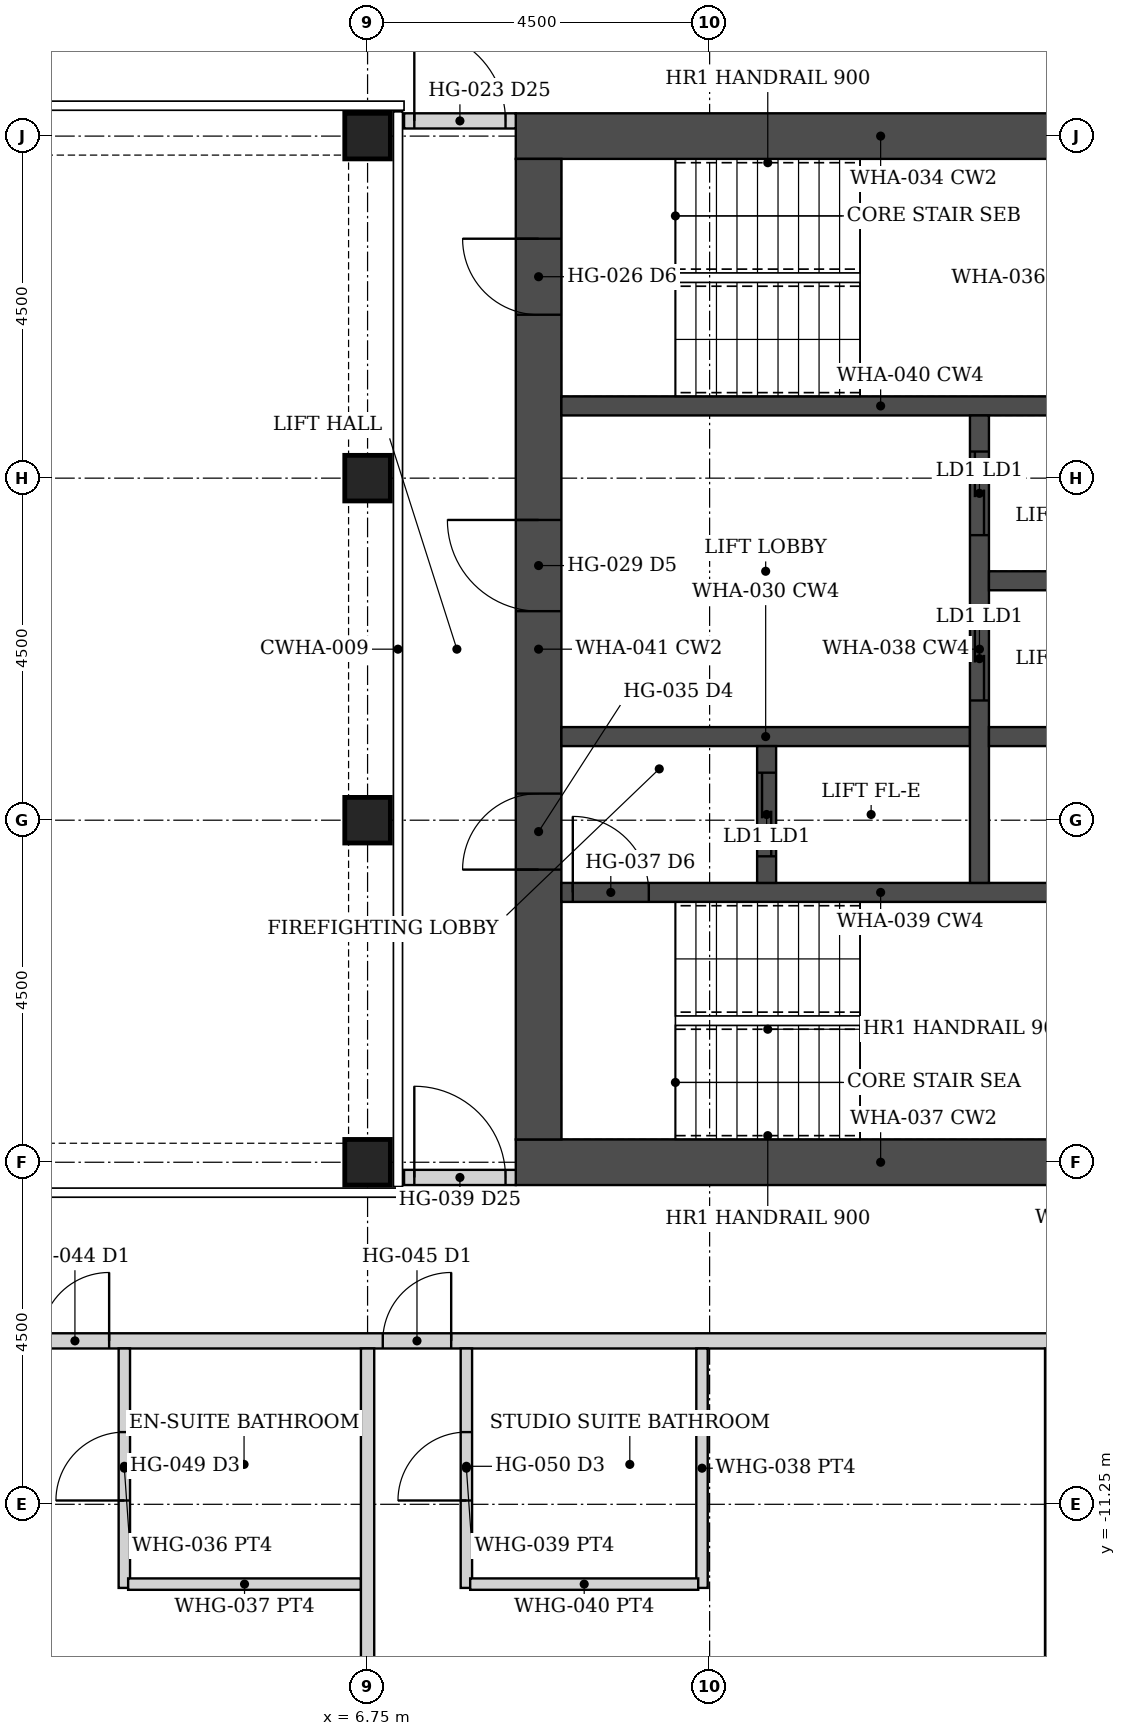
"""IFC4 building model, lengths in metres.
Left out: names, types, materials, properties, quantities, classifications, styles, units other than length and angle.
Written with IfcOpenShell. Run it as: python <this file> out.ifc"""

import sys

from ifc_helpers import new_model, si_unit, direction, frame, frame_2d, origin, origin_2d, place, context, subcontext, project, spatial, rectangle, hollow_rectangle, extrude, element, fill, save


model = new_model("IFC4")
c1 = context("Model", 3, precision=1e-05, world=origin(), true_north=direction((0.0, 1.0)))
c2 = subcontext(c1, "Body", "Model", "MODEL_VIEW")
j1 = project(units=[si_unit("LENGTHUNIT", "METRE"), si_unit("PLANEANGLEUNIT", "RADIAN")], contexts=[c1])
p1 = place(None, origin())
s1 = spatial("IfcSite", under=j1, at=p1, CompositionType="ELEMENT")
p2 = place(p1, origin())
s2 = spatial("IfcBuilding", under=s1, at=p2, CompositionType="ELEMENT")
p3 = place(p2, frame((0.0, 0.0, 183.2)))
s3 = spatial("IfcBuildingStorey", under=s2, at=p3, CompositionType="ELEMENT", Elevation=183.2)
for number, where, z_axis, x_axis in (
    (1, (6.75, -6.75, 0.0), (0.0, 0.0, 1.0), (1.0, 0.0, 0.0)),
    (2, (6.75, -2.25, 0.0), (0.0, 0.0, 1.0), (1.0, 0.0, 0.0)),
    (3, (6.75, 2.25, 0.0), (0.0, 0.0, 1.0), (1.0, 0.0, 0.0)),
    (4, (6.75, 6.75, 0.0), (0.0, 0.0, 1.0), (1.0, 0.0, 0.0)),
):
    element("IfcColumn", number, at=place(p3, frame(where, z_axis=z_axis, x_axis=x_axis)), inside=s3, PredefinedType="COLUMN", context=c2, shape_type="SweptSolid", body=[
        extrude(hollow_rectangle(XDim=0.6, YDim=0.6, WallThickness=0.03, at=origin_2d()), origin(), (0.0, 0.0, 1.0), 3.6),
    ])
for number, where, z_axis, x_axis in (
    (5, (8.7, -6.75, 0.0), (0.0, 0.0, 1.0), (1.0, 0.0, 0.0)),
    (6, (8.7, 6.75, 0.0), (0.0, 0.0, 1.0), (1.0, 0.0, 0.0)),
):
    element("IfcWall", number, at=place(p3, frame(where, z_axis=z_axis, x_axis=x_axis)), inside=s3, PredefinedType="SHEAR", context=c2, shape_type="SweptSolid", body=[
        extrude(rectangle(XDim=9.6, YDim=0.6, at=frame_2d((4.8, 0.0))), origin(), (0.0, 0.0, 1.0), 3.6),
    ])
p4 = place(p3, frame((9.0, -6.45, 0.0), z_axis=(0.0, 0.0, 1.0), x_axis=(0.0, 1.0, 0.0)))
e7 = element("IfcWall", 7, at=p4, inside=s3, PredefinedType="SHEAR", context=c2, shape_type="SweptSolid", body=[
    extrude(rectangle(XDim=12.9, YDim=0.6, at=frame_2d((6.45, 0.0))), origin(), (0.0, 0.0, 1.0), 3.6),
])
p5 = place(p4, frame((3.55, 0.0, 0.0)))
e8 = element("IfcOpeningElement", 8, at=p5, cuts=e7, PredefinedType="OPENING", context=c2, shape_type="SweptSolid", body=[
    extrude(rectangle(XDim=1.0, YDim=2.1, at=frame_2d((0.5, 1.05))), frame((0.0, 0.31, 0.0), z_axis=(0.0, -1.0, 0.0), x_axis=(1.0, 0.0, 0.0)), (0.0, 0.0, 1.0), 0.62),
])
p6 = place(p4, frame((6.95, 0.0, 0.0)))
e9 = element("IfcOpeningElement", 9, at=p6, cuts=e7, PredefinedType="OPENING", context=c2, shape_type="SweptSolid", body=[
    extrude(rectangle(XDim=1.2, YDim=2.1, at=frame_2d((0.6, 1.05))), frame((0.0, 0.31, 0.0), z_axis=(0.0, -1.0, 0.0), x_axis=(1.0, 0.0, 0.0)), (0.0, 0.0, 1.0), 0.62),
])
p7 = place(p4, frame((10.85, 0.0, 0.0)))
e10 = element("IfcOpeningElement", 10, at=p7, cuts=e7, PredefinedType="OPENING", context=c2, shape_type="SweptSolid", body=[
    extrude(rectangle(XDim=1.0, YDim=2.1, at=frame_2d((0.5, 1.05))), frame((0.0, 0.31, 0.0), z_axis=(0.0, -1.0, 0.0), x_axis=(1.0, 0.0, 0.0)), (0.0, 0.0, 1.0), 0.62),
])
p8 = place(p3, frame((9.3, -3.2, 0.0), z_axis=(0.0, 0.0, 1.0), x_axis=(1.0, 0.0, 0.0)))
e11 = element("IfcWall", 11, at=p8, inside=s3, PredefinedType="SHEAR", context=c2, shape_type="SweptSolid", body=[
    extrude(rectangle(XDim=8.4, YDim=0.25, at=frame_2d((4.2, 0.0))), origin(), (0.0, 0.0, 1.0), 3.6),
])
p9 = place(p8, frame((0.15, 0.0, 0.0)))
e12 = element("IfcOpeningElement", 12, at=p9, cuts=e11, PredefinedType="OPENING", context=c2, shape_type="SweptSolid", body=[
    extrude(rectangle(XDim=1.0, YDim=2.1, at=frame_2d((0.5, 1.05))), frame((0.0, 0.135, 0.0), z_axis=(0.0, -1.0, 0.0), x_axis=(1.0, 0.0, 0.0)), (0.0, 0.0, 1.0), 0.27),
])
p10 = place(p3, frame((9.3, 3.2, 0.0), z_axis=(0.0, 0.0, 1.0), x_axis=(1.0, 0.0, 0.0)))
e13 = element("IfcWall", 13, at=p10, inside=s3, PredefinedType="SHEAR", context=c2, shape_type="SweptSolid", body=[
    extrude(rectangle(XDim=8.4, YDim=0.25, at=frame_2d((4.2, 0.0))), origin(), (0.0, 0.0, 1.0), 3.6),
])
p11 = place(p3, frame((9.3, -1.15, 0.0), z_axis=(0.0, 0.0, 1.0), x_axis=(1.0, 0.0, 0.0)))
e14 = element("IfcWall", 14, at=p11, inside=s3, PredefinedType="SHEAR", context=c2, shape_type="SweptSolid", body=[
    extrude(rectangle(XDim=5.375, YDim=0.25, at=frame_2d((2.688, 0.0))), origin(), (0.0, 0.0, 1.0), 3.6),
])
p12 = place(p3, frame((12.0, -3.075, 0.0), z_axis=(0.0, 0.0, 1.0), x_axis=(0.0, 1.0, 0.0)))
e15 = element("IfcWall", 15, at=p12, inside=s3, PredefinedType="SHEAR", context=c2, shape_type="SweptSolid", body=[
    extrude(rectangle(XDim=1.8, YDim=0.25, at=frame_2d((0.9, 0.0))), origin(), (0.0, 0.0, 1.0), 3.6),
])
p13 = place(p12, frame((0.35, 0.0, 0.0)))
e16 = element("IfcOpeningElement", 16, at=p13, cuts=e15, PredefinedType="OPENING", context=c2, shape_type="SweptSolid", body=[
    extrude(rectangle(XDim=1.1, YDim=2.1, at=frame_2d((0.55, 1.05))), frame((0.0, 0.135, 0.0), z_axis=(0.0, -1.0, 0.0), x_axis=(1.0, 0.0, 0.0)), (0.0, 0.0, 1.0), 0.27),
])
p14 = place(p3, frame((14.8, -3.075, 0.0), z_axis=(0.0, 0.0, 1.0), x_axis=(0.0, 1.0, 0.0)))
e17 = element("IfcWall", 17, at=p14, inside=s3, PredefinedType="SHEAR", context=c2, shape_type="SweptSolid", body=[
    extrude(rectangle(XDim=6.15, YDim=0.25, at=frame_2d((3.075, 0.0))), origin(), (0.0, 0.0, 1.0), 3.6),
])
p15 = place(p14, frame((2.4, 0.0, 0.0)))
e18 = element("IfcOpeningElement", 18, at=p15, cuts=e17, PredefinedType="OPENING", context=c2, shape_type="SweptSolid", body=[
    extrude(rectangle(XDim=1.1, YDim=2.1, at=frame_2d((0.55, 1.05))), frame((0.0, 0.135, 0.0), z_axis=(0.0, -1.0, 0.0), x_axis=(1.0, 0.0, 0.0)), (0.0, 0.0, 1.0), 0.27),
])
p16 = place(p14, frame((4.575, 0.0, 0.0)))
e19 = element("IfcOpeningElement", 19, at=p16, cuts=e17, PredefinedType="OPENING", context=c2, shape_type="SweptSolid", body=[
    extrude(rectangle(XDim=1.1, YDim=2.1, at=frame_2d((0.55, 1.05))), frame((0.0, 0.135, 0.0), z_axis=(0.0, -1.0, 0.0), x_axis=(1.0, 0.0, 0.0)), (0.0, 0.0, 1.0), 0.27),
])
for number, where, z_axis, x_axis in (
    (20, (14.925, -1.15, 0.0), (0.0, 0.0, 1.0), (1.0, 0.0, 0.0)),
    (21, (14.925, 0.9, 0.0), (0.0, 0.0, 1.0), (1.0, 0.0, 0.0)),
):
    element("IfcWall", number, at=place(p3, frame(where, z_axis=z_axis, x_axis=x_axis)), inside=s3, PredefinedType="SHEAR", context=c2, shape_type="SweptSolid", body=[
        extrude(rectangle(XDim=2.775, YDim=0.25, at=frame_2d((1.387, 0.0))), origin(), (0.0, 0.0, 1.0), 3.6),
    ])
p17 = place(p3, frame((7.23, 6.95, 0.0), z_axis=(0.0, 0.0, 1.0), x_axis=(1.0, 0.0, 0.0)))
e22 = element("IfcWall", 22, at=p17, inside=s3, PredefinedType="PARTITIONING", context=c2, shape_type="SweptSolid", body=[
    extrude(rectangle(XDim=1.47, YDim=0.2, at=frame_2d((0.735, 0.0))), origin(), (0.0, 0.0, 1.0), 2.473),
])
p18 = place(p17, frame((0.135, 0.0, 0.0)))
e23 = element("IfcOpeningElement", 23, at=p18, cuts=e22, PredefinedType="OPENING", context=c2, shape_type="SweptSolid", body=[
    extrude(rectangle(XDim=1.2, YDim=2.1, at=frame_2d((0.6, 1.05))), frame((0.0, 0.11, 0.0), z_axis=(0.0, -1.0, 0.0), x_axis=(1.0, 0.0, 0.0)), (0.0, 0.0, 1.0), 0.22),
])
p19 = place(p3, frame((7.23, -6.95, 0.0), z_axis=(0.0, 0.0, 1.0), x_axis=(1.0, 0.0, 0.0)))
e24 = element("IfcWall", 24, at=p19, inside=s3, PredefinedType="PARTITIONING", context=c2, shape_type="SweptSolid", body=[
    extrude(rectangle(XDim=1.47, YDim=0.2, at=frame_2d((0.735, 0.0))), origin(), (0.0, 0.0, 1.0), 2.473),
])
p20 = place(p19, frame((0.135, 0.0, 0.0)))
e25 = element("IfcOpeningElement", 25, at=p20, cuts=e24, PredefinedType="OPENING", context=c2, shape_type="SweptSolid", body=[
    extrude(rectangle(XDim=1.2, YDim=2.1, at=frame_2d((0.6, 1.05))), frame((0.0, 0.11, 0.0), z_axis=(0.0, -1.0, 0.0), x_axis=(1.0, 0.0, 0.0)), (0.0, 0.0, 1.0), 0.22),
])
p21 = place(p3, frame((-22.3, -9.1, 0.0), z_axis=(0.0, 0.0, 1.0), x_axis=(1.0, 0.0, 0.0)))
e26 = element("IfcWall", 26, at=p21, inside=s3, PredefinedType="PARTITIONING", context=c2, shape_type="SweptSolid", body=[
    extrude(rectangle(XDim=44.6, YDim=0.2, at=frame_2d((22.3, 0.0))), origin(), (0.0, 0.0, 1.0), 2.473),
])
p22 = place(p21, frame((11.35, 0.0, 0.0)))
e27 = element("IfcOpeningElement", 27, at=p22, cuts=e26, PredefinedType="OPENING", context=c2, shape_type="SweptSolid", body=[
    extrude(rectangle(XDim=0.9, YDim=2.1, at=frame_2d((0.45, 1.05))), frame((0.0, 0.11, 0.0), z_axis=(0.0, -1.0, 0.0), x_axis=(1.0, 0.0, 0.0)), (0.0, 0.0, 1.0), 0.22),
])
p23 = place(p21, frame((15.75, 0.0, 0.0)))
e28 = element("IfcOpeningElement", 28, at=p23, cuts=e26, PredefinedType="OPENING", context=c2, shape_type="SweptSolid", body=[
    extrude(rectangle(XDim=0.9, YDim=2.1, at=frame_2d((0.45, 1.05))), frame((0.0, 0.11, 0.0), z_axis=(0.0, -1.0, 0.0), x_axis=(1.0, 0.0, 0.0)), (0.0, 0.0, 1.0), 0.22),
])
p24 = place(p21, frame((23.45, 0.0, 0.0)))
e29 = element("IfcOpeningElement", 29, at=p24, cuts=e26, PredefinedType="OPENING", context=c2, shape_type="SweptSolid", body=[
    extrude(rectangle(XDim=0.9, YDim=2.1, at=frame_2d((0.45, 1.05))), frame((0.0, 0.11, 0.0), z_axis=(0.0, -1.0, 0.0), x_axis=(1.0, 0.0, 0.0)), (0.0, 0.0, 1.0), 0.22),
])
p25 = place(p21, frame((24.75, 0.0, 0.0)))
e30 = element("IfcOpeningElement", 30, at=p25, cuts=e26, PredefinedType="OPENING", context=c2, shape_type="SweptSolid", body=[
    extrude(rectangle(XDim=0.9, YDim=2.1, at=frame_2d((0.45, 1.05))), frame((0.0, 0.11, 0.0), z_axis=(0.0, -1.0, 0.0), x_axis=(1.0, 0.0, 0.0)), (0.0, 0.0, 1.0), 0.22),
])
p26 = place(p21, frame((29.25, 0.0, 0.0)))
e31 = element("IfcOpeningElement", 31, at=p26, cuts=e26, PredefinedType="OPENING", context=c2, shape_type="SweptSolid", body=[
    extrude(rectangle(XDim=0.9, YDim=2.1, at=frame_2d((0.45, 1.05))), frame((0.0, 0.11, 0.0), z_axis=(0.0, -1.0, 0.0), x_axis=(1.0, 0.0, 0.0)), (0.0, 0.0, 1.0), 0.22),
])
p27 = place(p21, frame((38.85, 0.0, 0.0)))
e32 = element("IfcOpeningElement", 32, at=p27, cuts=e26, PredefinedType="OPENING", context=c2, shape_type="SweptSolid", body=[
    extrude(rectangle(XDim=0.9, YDim=2.1, at=frame_2d((0.45, 1.05))), frame((0.0, 0.11, 0.0), z_axis=(0.0, -1.0, 0.0), x_axis=(1.0, 0.0, 0.0)), (0.0, 0.0, 1.0), 0.22),
])
p28 = place(p21, frame((4.85, 0.0, 0.0)))
e33 = element("IfcOpeningElement", 33, at=p28, cuts=e26, PredefinedType="OPENING", context=c2, shape_type="SweptSolid", body=[
    extrude(rectangle(XDim=0.9, YDim=2.1, at=frame_2d((0.45, 1.05))), frame((0.0, 0.11, 0.0), z_axis=(0.0, -1.0, 0.0), x_axis=(1.0, 0.0, 0.0)), (0.0, 0.0, 1.0), 0.22),
])
p29 = place(p3, frame((3.55, -12.35, 0.0), z_axis=(0.0, 0.0, 1.0), x_axis=(0.0, 1.0, 0.0)))
e34 = element("IfcWall", 34, at=p29, inside=s3, PredefinedType="PARTITIONING", context=c2, shape_type="SweptSolid", body=[
    extrude(rectangle(XDim=3.15, YDim=0.15, at=frame_2d((1.575, 0.0))), origin(), (0.0, 0.0, 1.0), 2.473),
])
p30 = place(p29, frame((1.15, 0.0, 0.0)))
e35 = element("IfcOpeningElement", 35, at=p30, cuts=e34, PredefinedType="OPENING", context=c2, shape_type="SweptSolid", body=[
    extrude(rectangle(XDim=0.9, YDim=2.1, at=frame_2d((0.45, 1.05))), frame((0.0, 0.085, 0.0), z_axis=(0.0, -1.0, 0.0), x_axis=(1.0, 0.0, 0.0)), (0.0, 0.0, 1.0), 0.17),
])
p31 = place(p3, frame((3.6, -12.3, 0.0), z_axis=(0.0, 0.0, 1.0), x_axis=(1.0, 0.0, 0.0)))
e36 = element("IfcWall", 36, at=p31, inside=s3, PredefinedType="PARTITIONING", context=c2, shape_type="SweptSolid", body=[
    extrude(rectangle(XDim=3.062, YDim=0.15, at=frame_2d((1.531, 0.0))), origin(), (0.0, 0.0, 1.0), 2.473),
])
p32 = place(p3, frame((8.05, -12.35, 0.0), z_axis=(0.0, 0.0, 1.0), x_axis=(0.0, 1.0, 0.0)))
e37 = element("IfcWall", 37, at=p32, inside=s3, PredefinedType="PARTITIONING", context=c2, shape_type="SweptSolid", body=[
    extrude(rectangle(XDim=3.15, YDim=0.15, at=frame_2d((1.575, 0.0))), origin(), (0.0, 0.0, 1.0), 2.473),
])
p33 = place(p32, frame((1.15, 0.0, 0.0)))
e38 = element("IfcOpeningElement", 38, at=p33, cuts=e37, PredefinedType="OPENING", context=c2, shape_type="SweptSolid", body=[
    extrude(rectangle(XDim=0.9, YDim=2.1, at=frame_2d((0.45, 1.05))), frame((0.0, 0.085, 0.0), z_axis=(0.0, -1.0, 0.0), x_axis=(1.0, 0.0, 0.0)), (0.0, 0.0, 1.0), 0.17),
])
p34 = place(p3, frame((11.15, -12.35, 0.0), z_axis=(0.0, 0.0, 1.0), x_axis=(0.0, 1.0, 0.0)))
e39 = element("IfcWall", 39, at=p34, inside=s3, PredefinedType="PARTITIONING", context=c2, shape_type="SweptSolid", body=[
    extrude(rectangle(XDim=3.15, YDim=0.15, at=frame_2d((1.575, 0.0))), origin(), (0.0, 0.0, 1.0), 2.473),
])
p35 = place(p3, frame((8.1, -12.3, 0.0), z_axis=(0.0, 0.0, 1.0), x_axis=(1.0, 0.0, 0.0)))
e40 = element("IfcWall", 40, at=p35, inside=s3, PredefinedType="PARTITIONING", context=c2, shape_type="SweptSolid", body=[
    extrude(rectangle(XDim=3.0, YDim=0.15, at=frame_2d((1.5, 0.0))), origin(), (0.0, 0.0, 1.0), 2.473),
])
for number, where, z_axis, x_axis in (
    (41, (6.75, -22.1, 0.0), (0.0, 0.0, 1.0), (0.0, 1.0, 0.0)),
    (42, (15.75, -22.1, 0.0), (0.0, 0.0, 1.0), (0.0, 1.0, 0.0)),
):
    element("IfcWall", number, at=place(p3, frame(where, z_axis=z_axis, x_axis=x_axis)), inside=s3, PredefinedType="PARTITIONING", context=c2, shape_type="SweptSolid", body=[
        extrude(rectangle(XDim=12.9, YDim=0.175, at=frame_2d((6.45, 0.0))), origin(), (0.0, 0.0, 1.0), 2.473),
    ])
p36 = place(p18, origin())
e43 = element("IfcDoor", 43, at=p36, inside=s3, OperationType="DOUBLE_DOOR_DOUBLE_SWING", PredefinedType="DOOR", context=c2, shape_type="SweptSolid", body=[
    extrude(rectangle(XDim=1.2, YDim=2.1, at=frame_2d((0.6, 1.05))), frame((0.0, 0.025, 0.0), z_axis=(0.0, -1.0, 0.0), x_axis=(1.0, 0.0, 0.0)), (0.0, 0.0, 1.0), 0.05),
])
fill(e23, e43)
p37 = place(p20, origin())
e44 = element("IfcDoor", 44, at=p37, inside=s3, OperationType="DOUBLE_DOOR_DOUBLE_SWING", PredefinedType="DOOR", context=c2, shape_type="SweptSolid", body=[
    extrude(rectangle(XDim=1.2, YDim=2.1, at=frame_2d((0.6, 1.05))), frame((0.0, 0.025, 0.0), z_axis=(0.0, -1.0, 0.0), x_axis=(1.0, 0.0, 0.0)), (0.0, 0.0, 1.0), 0.05),
])
fill(e25, e44)
p38 = place(p25, origin())
e45 = element("IfcDoor", 45, at=p38, inside=s3, OperationType="SINGLE_SWING_RIGHT", PredefinedType="DOOR", context=c2, shape_type="SweptSolid", body=[
    extrude(rectangle(XDim=0.9, YDim=2.1, at=frame_2d((0.45, 1.05))), frame((0.0, 0.025, 0.0), z_axis=(0.0, -1.0, 0.0), x_axis=(1.0, 0.0, 0.0)), (0.0, 0.0, 1.0), 0.05),
])
fill(e30, e45)
p39 = place(p30, origin())
e46 = element("IfcDoor", 46, at=p39, inside=s3, OperationType="SINGLE_SWING_LEFT", PredefinedType="DOOR", context=c2, shape_type="SweptSolid", body=[
    extrude(rectangle(XDim=0.9, YDim=2.1, at=frame_2d((0.45, 1.05))), frame((0.0, 0.025, 0.0), z_axis=(0.0, -1.0, 0.0), x_axis=(1.0, 0.0, 0.0)), (0.0, 0.0, 1.0), 0.05),
])
fill(e35, e46)
p40 = place(p26, origin())
e47 = element("IfcDoor", 47, at=p40, inside=s3, OperationType="SINGLE_SWING_RIGHT", PredefinedType="DOOR", context=c2, shape_type="SweptSolid", body=[
    extrude(rectangle(XDim=0.9, YDim=2.1, at=frame_2d((0.45, 1.05))), frame((0.0, 0.025, 0.0), z_axis=(0.0, -1.0, 0.0), x_axis=(1.0, 0.0, 0.0)), (0.0, 0.0, 1.0), 0.05),
])
fill(e31, e47)
p41 = place(p33, origin())
e48 = element("IfcDoor", 48, at=p41, inside=s3, OperationType="SINGLE_SWING_LEFT", PredefinedType="DOOR", context=c2, shape_type="SweptSolid", body=[
    extrude(rectangle(XDim=0.9, YDim=2.1, at=frame_2d((0.45, 1.05))), frame((0.0, 0.025, 0.0), z_axis=(0.0, -1.0, 0.0), x_axis=(1.0, 0.0, 0.0)), (0.0, 0.0, 1.0), 0.05),
])
fill(e38, e48)
p42 = place(p5, origin())
e49 = element("IfcDoor", 49, at=p42, inside=s3, OperationType="SINGLE_SWING_LEFT", PredefinedType="DOOR", context=c2, shape_type="SweptSolid", body=[
    extrude(rectangle(XDim=1.0, YDim=2.1, at=frame_2d((0.5, 1.05))), frame((0.0, 0.025, 0.0), z_axis=(0.0, -1.0, 0.0), x_axis=(1.0, 0.0, 0.0)), (0.0, 0.0, 1.0), 0.05),
])
fill(e8, e49)
p43 = place(p9, origin())
e50 = element("IfcDoor", 50, at=p43, inside=s3, OperationType="SINGLE_SWING_LEFT", PredefinedType="DOOR", context=c2, shape_type="SweptSolid", body=[
    extrude(rectangle(XDim=1.0, YDim=2.1, at=frame_2d((0.5, 1.05))), frame((0.0, 0.025, 0.0), z_axis=(0.0, -1.0, 0.0), x_axis=(1.0, 0.0, 0.0)), (0.0, 0.0, 1.0), 0.05),
])
fill(e12, e50)
p44 = place(p6, origin())
e51 = element("IfcDoor", 51, at=p44, inside=s3, OperationType="SINGLE_SWING_RIGHT", PredefinedType="DOOR", context=c2, shape_type="SweptSolid", body=[
    extrude(rectangle(XDim=1.2, YDim=2.1, at=frame_2d((0.6, 1.05))), frame((0.0, 0.025, 0.0), z_axis=(0.0, -1.0, 0.0), x_axis=(1.0, 0.0, 0.0)), (0.0, 0.0, 1.0), 0.05),
])
fill(e9, e51)
p45 = place(p7, origin())
e52 = element("IfcDoor", 52, at=p45, inside=s3, OperationType="SINGLE_SWING_RIGHT", PredefinedType="DOOR", context=c2, shape_type="SweptSolid", body=[
    extrude(rectangle(XDim=1.0, YDim=2.1, at=frame_2d((0.5, 1.05))), frame((0.0, 0.025, 0.0), z_axis=(0.0, -1.0, 0.0), x_axis=(1.0, 0.0, 0.0)), (0.0, 0.0, 1.0), 0.05),
])
fill(e10, e52)
p46 = place(p13, origin())
e53 = element("IfcDoor", 53, at=p46, inside=s3, OperationType="DOUBLE_DOOR_SLIDING", PredefinedType="DOOR", context=c2, shape_type="SweptSolid", body=[
    extrude(rectangle(XDim=1.1, YDim=2.1, at=frame_2d((0.55, 1.05))), frame((0.0, 0.025, 0.0), z_axis=(0.0, -1.0, 0.0), x_axis=(1.0, 0.0, 0.0)), (0.0, 0.0, 1.0), 0.05),
])
fill(e16, e53)
p47 = place(p15, origin())
e54 = element("IfcDoor", 54, at=p47, inside=s3, OperationType="DOUBLE_DOOR_SLIDING", PredefinedType="DOOR", context=c2, shape_type="SweptSolid", body=[
    extrude(rectangle(XDim=1.1, YDim=2.1, at=frame_2d((0.55, 1.05))), frame((0.0, 0.025, 0.0), z_axis=(0.0, -1.0, 0.0), x_axis=(1.0, 0.0, 0.0)), (0.0, 0.0, 1.0), 0.05),
])
fill(e18, e54)
p48 = place(p16, origin())
e55 = element("IfcDoor", 55, at=p48, inside=s3, OperationType="DOUBLE_DOOR_SLIDING", PredefinedType="DOOR", context=c2, shape_type="SweptSolid", body=[
    extrude(rectangle(XDim=1.1, YDim=2.1, at=frame_2d((0.55, 1.05))), frame((0.0, 0.025, 0.0), z_axis=(0.0, -1.0, 0.0), x_axis=(1.0, 0.0, 0.0)), (0.0, 0.0, 1.0), 0.05),
])
fill(e19, e55)
save(model, sys.argv[1])
